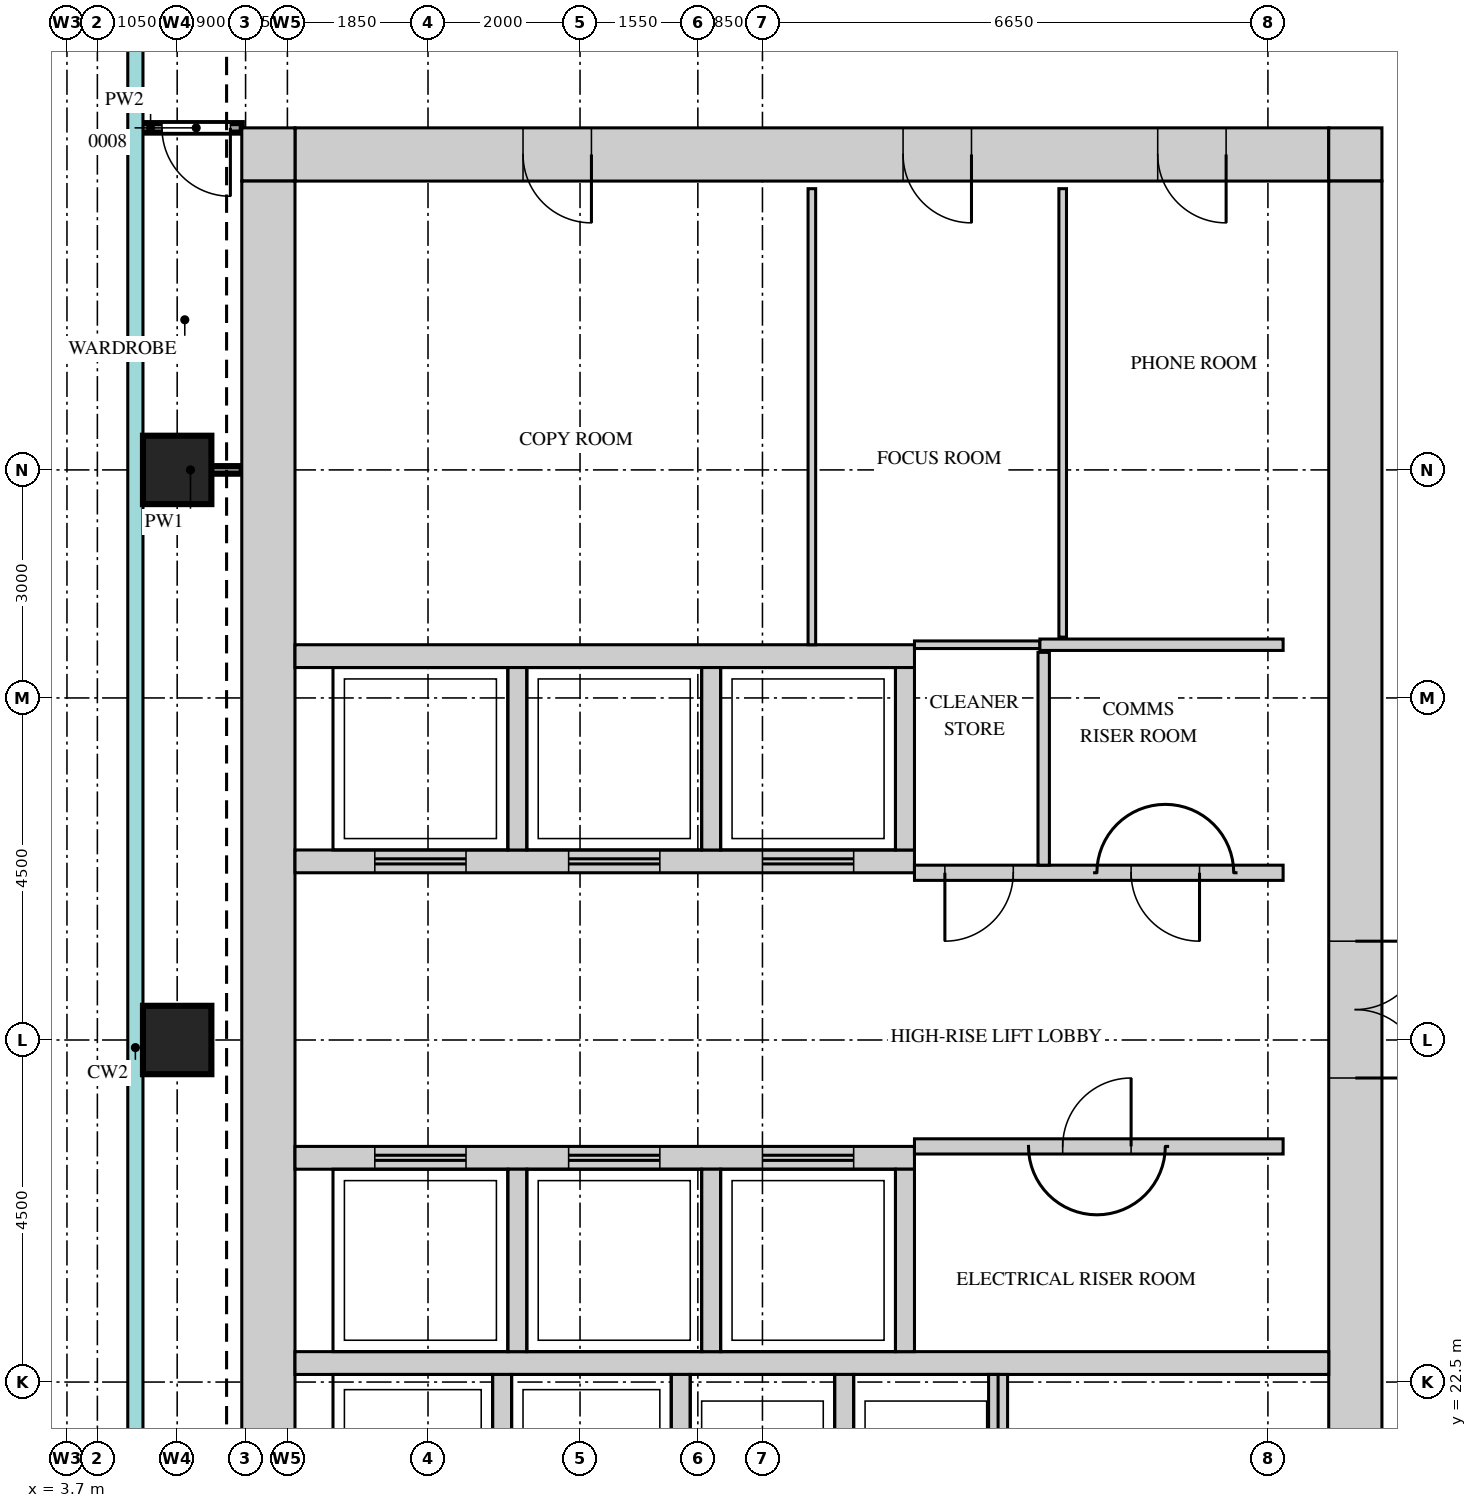
"""IFC4 building model, lengths in metres.
Left out: names, types, materials, properties, quantities, classifications, styles, units other than length and angle.
Written with IfcOpenShell. Run it as: python <this file> out.ifc"""

import sys

from ifc_helpers import new_model, si_unit, direction, frame, frame_2d, origin, origin_2d, place, context, subcontext, project, spatial, rectangle, extrude, source, transform, mapped, element, fill, save


model = new_model("IFC4")
c1 = context("Model", 3, precision=1e-05, world=origin(), true_north=direction((0.0, 1.0)))
c2 = subcontext(c1, "Body", "Model", "MODEL_VIEW")
j1 = project(units=[si_unit("LENGTHUNIT", "METRE"), si_unit("PLANEANGLEUNIT", "RADIAN")], contexts=[c1])
p1 = place(None, origin())
s1 = spatial("IfcSite", under=j1, at=p1, CompositionType="ELEMENT")
p2 = place(p1, origin())
s2 = spatial("IfcBuilding", under=s1, at=p2, CompositionType="ELEMENT")
p3 = place(p2, frame((0.0, 0.0, 270.2)))
s3 = spatial("IfcBuildingStorey", under=s2, at=p3, CompositionType="ELEMENT", Elevation=270.2)
m1 = source(origin(), c2, "Body", "SweptSolid", [
    extrude(rectangle(XDim=13.6, YDim=0.7, at=frame_2d((6.8, 0.0))), origin(), (0.0, 0.0, 1.0), 3.75),
])
p4 = place(p3, frame((6.7, 38.65, 0.0), z_axis=(0.0, 0.0, 1.0), x_axis=(1.0, 0.0, 0.0)))
e1 = element("IfcWall", 1, at=p4, inside=s3, PredefinedType="SHEAR", context=c2, shape_type="MappedRepresentation", body=[
    mapped(m1, transform((0.0, 0.0, 0.0))),
])
m2 = source(origin(), c2, "Body", "SweptSolid", [
    extrude(rectangle(XDim=0.9, YDim=2.1, at=frame_2d((0.45, 1.05))), frame((0.0, 0.36, 0.0), z_axis=(0.0, -1.0, 0.0), x_axis=(1.0, 0.0, 0.0)), (0.0, 0.0, 1.0), 0.72),
])
p5 = place(p4, frame((3.0, 0.0, 0.0)))
e2 = element("IfcOpeningElement", 2, at=p5, cuts=e1, PredefinedType="OPENING", context=c2, shape_type="MappedRepresentation", body=[
    mapped(m2, transform((0.0, 0.0, 0.0))),
])
p6 = place(p4, frame((8.0, 0.0, 0.0)))
e3 = element("IfcOpeningElement", 3, at=p6, cuts=e1, PredefinedType="OPENING", context=c2, shape_type="MappedRepresentation", body=[
    mapped(m2, transform((0.0, 0.0, 0.0))),
])
p7 = place(p4, frame((11.35, 0.0, 0.0)))
e4 = element("IfcOpeningElement", 4, at=p7, cuts=e1, PredefinedType="OPENING", context=c2, shape_type="MappedRepresentation", body=[
    mapped(m2, transform((0.0, 0.0, 0.0))),
])
m3 = source(origin(), c2, "Body", "SweptSolid", [
    extrude(rectangle(XDim=0.7, YDim=0.7, at=frame_2d((0.35, 0.0))), origin(), (0.0, 0.0, 1.0), 3.75),
])
for number, where, z_axis, x_axis in (
    (5, (20.3, 38.65, 0.0), (0.0, 0.0, 1.0), (1.0, 0.0, 0.0)),
    (6, (6.0, 38.65, 0.0), (0.0, 0.0, 1.0), (1.0, 0.0, 0.0)),
):
    element("IfcWall", number, at=place(p3, frame(where, z_axis=z_axis, x_axis=x_axis)), inside=s3, PredefinedType="SHEAR", context=c2, shape_type="MappedRepresentation", body=[
        mapped(m3, transform((0.0, 0.0, 0.0))),
    ])
m4 = source(origin(), c2, "Body", "SweptSolid", [
    extrude(rectangle(XDim=22.6, YDim=0.7, at=frame_2d((11.3, 0.0))), origin(), (0.0, 0.0, 1.0), 3.75),
])
p8 = place(p3, frame((20.65, 15.7, 0.0), z_axis=(0.0, 0.0, 1.0), x_axis=(0.0, 1.0, 0.0)))
e7 = element("IfcWall", 7, at=p8, inside=s3, PredefinedType="SHEAR", context=c2, shape_type="MappedRepresentation", body=[
    mapped(m4, transform((0.0, 0.0, 0.0))),
])
m5 = source(origin(), c2, "Body", "SweptSolid", [
    extrude(rectangle(XDim=1.8, YDim=2.1, at=frame_2d((0.9, 1.05))), frame((0.0, 0.36, 0.0), z_axis=(0.0, -1.0, 0.0), x_axis=(1.0, 0.0, 0.0)), (0.0, 0.0, 1.0), 0.72),
])
p9 = place(p8, frame((10.8, 0.0, 0.0)))
e8 = element("IfcOpeningElement", 8, at=p9, cuts=e7, PredefinedType="OPENING", context=c2, shape_type="MappedRepresentation", body=[
    mapped(m5, transform((0.0, 0.0, 0.0))),
])
p10 = place(p8, frame((0.45, 0.0, 0.0)))
e9 = element("IfcOpeningElement", 9, at=p10, cuts=e7, PredefinedType="OPENING", context=c2, shape_type="MappedRepresentation", body=[
    mapped(m2, transform((0.0, 0.0, 0.0))),
])
p11 = place(p8, frame((4.0, 0.0, 0.0)))
e10 = element("IfcOpeningElement", 10, at=p11, cuts=e7, PredefinedType="OPENING", context=c2, shape_type="MappedRepresentation", body=[
    mapped(m2, transform((0.0, 0.0, 0.0))),
])
p12 = place(p3, frame((6.35, 15.7, 0.0), z_axis=(0.0, 0.0, 1.0), x_axis=(0.0, 1.0, 0.0)))
e11 = element("IfcWall", 11, at=p12, inside=s3, PredefinedType="SHEAR", context=c2, shape_type="MappedRepresentation", body=[
    mapped(m4, transform((0.0, 0.0, 0.0))),
])
m6 = source(origin(), c2, "Body", "SweptSolid", [
    extrude(rectangle(XDim=13.6, YDim=0.3, at=frame_2d((6.8, 0.0))), origin(), (0.0, 0.0, 1.0), 3.75),
])
p13 = place(p3, frame((6.7, 22.75, 0.0), z_axis=(0.0, 0.0, 1.0), x_axis=(1.0, 0.0, 0.0)))
e12 = element("IfcWall", 12, at=p13, inside=s3, PredefinedType="STANDARD", context=c2, shape_type="MappedRepresentation", body=[
    mapped(m6, transform((0.0, 0.0, 0.0))),
])
m7 = source(origin(), c2, "Body", "SweptSolid", [
    extrude(rectangle(XDim=8.15, YDim=0.3, at=frame_2d((4.075, 0.0))), origin(), (0.0, 0.0, 1.0), 3.75),
])
p14 = place(p3, frame((6.7, 32.05, 0.0), z_axis=(0.0, 0.0, 1.0), x_axis=(1.0, 0.0, 0.0)))
e13 = element("IfcWall", 13, at=p14, inside=s3, PredefinedType="STANDARD", context=c2, shape_type="MappedRepresentation", body=[
    mapped(m7, transform((0.0, 0.0, 0.0))),
])
p15 = place(p3, frame((6.7, 29.35, 0.0), z_axis=(0.0, 0.0, 1.0), x_axis=(1.0, 0.0, 0.0)))
e14 = element("IfcWall", 14, at=p15, inside=s3, PredefinedType="STANDARD", context=c2, shape_type="MappedRepresentation", body=[
    mapped(m7, transform((0.0, 0.0, 0.0))),
])
m8 = source(origin(), c2, "Body", "SweptSolid", [
    extrude(rectangle(XDim=1.2, YDim=2.1, at=frame_2d((0.6, 1.05))), frame((0.0, 0.16, 0.0), z_axis=(0.0, -1.0, 0.0), x_axis=(1.0, 0.0, 0.0)), (0.0, 0.0, 1.0), 0.32),
])
p16 = place(p15, frame((1.05, 0.0, 0.0)))
e15 = element("IfcOpeningElement", 15, at=p16, cuts=e14, PredefinedType="OPENING", context=c2, shape_type="MappedRepresentation", body=[
    mapped(m8, transform((0.0, 0.0, 0.0))),
])
p17 = place(p15, frame((3.6, 0.0, 0.0)))
e16 = element("IfcOpeningElement", 16, at=p17, cuts=e14, PredefinedType="OPENING", context=c2, shape_type="MappedRepresentation", body=[
    mapped(m8, transform((0.0, 0.0, 0.0))),
])
p18 = place(p15, frame((6.15, 0.0, 0.0)))
e17 = element("IfcOpeningElement", 17, at=p18, cuts=e14, PredefinedType="OPENING", context=c2, shape_type="MappedRepresentation", body=[
    mapped(m8, transform((0.0, 0.0, 0.0))),
])
p19 = place(p3, frame((6.7, 25.45, 0.0), z_axis=(0.0, 0.0, 1.0), x_axis=(1.0, 0.0, 0.0)))
e18 = element("IfcWall", 18, at=p19, inside=s3, PredefinedType="STANDARD", context=c2, shape_type="MappedRepresentation", body=[
    mapped(m7, transform((0.0, 0.0, 0.0))),
])
p20 = place(p19, frame((1.05, 0.0, 0.0)))
e19 = element("IfcOpeningElement", 19, at=p20, cuts=e18, PredefinedType="OPENING", context=c2, shape_type="MappedRepresentation", body=[
    mapped(m8, transform((0.0, 0.0, 0.0))),
])
p21 = place(p19, frame((3.6, 0.0, 0.0)))
e20 = element("IfcOpeningElement", 20, at=p21, cuts=e18, PredefinedType="OPENING", context=c2, shape_type="MappedRepresentation", body=[
    mapped(m8, transform((0.0, 0.0, 0.0))),
])
p22 = place(p19, frame((6.15, 0.0, 0.0)))
e21 = element("IfcOpeningElement", 21, at=p22, cuts=e18, PredefinedType="OPENING", context=c2, shape_type="MappedRepresentation", body=[
    mapped(m8, transform((0.0, 0.0, 0.0))),
])
m9 = source(origin(), c2, "Body", "SweptSolid", [
    extrude(rectangle(XDim=3.1, YDim=0.25, at=frame_2d((1.55, 0.0))), origin(), (0.0, 0.0, 1.0), 3.75),
])
for number, where, z_axis, x_axis in (
    (22, (9.425, 19.5, 0.0), (0.0, 0.0, 1.0), (0.0, 1.0, 0.0)),
    (23, (11.775, 19.5, 0.0), (0.0, 0.0, 1.0), (0.0, 1.0, 0.0)),
    (24, (13.925, 19.5, 0.0), (0.0, 0.0, 1.0), (0.0, 1.0, 0.0)),
    (25, (15.95, 19.5, 0.0), (0.0, 0.0, 1.0), (0.0, 1.0, 0.0)),
):
    element("IfcWall", number, at=place(p3, frame(where, z_axis=z_axis, x_axis=x_axis)), inside=s3, PredefinedType="STANDARD", context=c2, shape_type="MappedRepresentation", body=[
        mapped(m9, transform((0.0, 0.0, 0.0))),
    ])
m10 = source(origin(), c2, "Body", "SweptSolid", [
    extrude(rectangle(XDim=2.4, YDim=0.25, at=frame_2d((1.2, 0.0))), origin(), (0.0, 0.0, 1.0), 3.75),
])
for number, where, z_axis, x_axis in (
    (26, (9.625, 29.5, 0.0), (0.0, 0.0, 1.0), (0.0, 1.0, 0.0)),
    (27, (12.175, 29.5, 0.0), (0.0, 0.0, 1.0), (0.0, 1.0, 0.0)),
    (28, (14.725, 29.5, 0.0), (0.0, 0.0, 1.0), (0.0, 1.0, 0.0)),
):
    element("IfcWall", number, at=place(p3, frame(where, z_axis=z_axis, x_axis=x_axis)), inside=s3, PredefinedType="STANDARD", context=c2, shape_type="MappedRepresentation", body=[
        mapped(m10, transform((0.0, 0.0, 0.0))),
    ])
m11 = source(origin(), c2, "Body", "SweptSolid", [
    extrude(rectangle(XDim=2.4, YDim=0.25, at=frame_2d((1.2, 0.0))), origin(), (0.0, 0.0, 1.0), 3.75),
])
for number, where, z_axis, x_axis in (
    (29, (9.625, 22.9, 0.0), (0.0, 0.0, 1.0), (0.0, 1.0, 0.0)),
    (30, (12.175, 22.9, 0.0), (0.0, 0.0, 1.0), (0.0, 1.0, 0.0)),
    (31, (14.725, 22.9, 0.0), (0.0, 0.0, 1.0), (0.0, 1.0, 0.0)),
):
    element("IfcWall", number, at=place(p3, frame(where, z_axis=z_axis, x_axis=x_axis)), inside=s3, PredefinedType="STANDARD", context=c2, shape_type="MappedRepresentation", body=[
        mapped(m11, transform((0.0, 0.0, 0.0))),
    ])
m12 = source(origin(), c2, "Body", "SweptSolid", [
    extrude(rectangle(XDim=0.9, YDim=0.9, at=origin_2d()), origin(), (0.0, 0.0, 1.0), 4.0),
])
for number, where, z_axis, x_axis in (
    (32, (5.15, 27.0, 0.0), (0.0, 0.0, 1.0), (1.0, 0.0, 0.0)),
    (33, (5.15, 34.5, 0.0), (0.0, 0.0, 1.0), (1.0, 0.0, 0.0)),
):
    element("IfcColumn", number, at=place(p3, frame(where, z_axis=z_axis, x_axis=x_axis)), inside=s3, PredefinedType="COLUMN", context=c2, shape_type="MappedRepresentation", body=[
        mapped(m12, transform((0.0, 0.0, 0.0))),
    ])
m13 = source(origin(), c2, "Body", "SweptSolid", [
    extrude(rectangle(XDim=4.85, YDim=0.2, at=frame_2d((2.425, 0.0))), origin(), (0.0, 0.0, 1.0), 3.8),
])
p23 = place(p3, frame((14.85, 25.6, 0.0), z_axis=(0.0, 0.0, 1.0), x_axis=(1.0, 0.0, 0.0)))
e34 = element("IfcWall", 34, at=p23, inside=s3, PredefinedType="PARTITIONING", context=c2, shape_type="MappedRepresentation", body=[
    mapped(m13, transform((0.0, 0.0, 0.0))),
])
m14 = source(origin(), c2, "Body", "SweptSolid", [
    extrude(rectangle(XDim=0.9, YDim=2.1, at=frame_2d((0.45, 1.05))), frame((0.0, 0.11, 0.0), z_axis=(0.0, -1.0, 0.0), x_axis=(1.0, 0.0, 0.0)), (0.0, 0.0, 1.0), 0.22),
])
p24 = place(p23, frame((1.95, 0.0, 0.0)))
e35 = element("IfcOpeningElement", 35, at=p24, cuts=e34, PredefinedType="OPENING", context=c2, shape_type="MappedRepresentation", body=[
    mapped(m14, transform((0.0, 0.0, 0.0))),
])
p25 = place(p3, frame((14.85, 29.2, 0.0), z_axis=(0.0, 0.0, 1.0), x_axis=(1.0, 0.0, 0.0)))
e36 = element("IfcWall", 36, at=p25, inside=s3, PredefinedType="PARTITIONING", context=c2, shape_type="MappedRepresentation", body=[
    mapped(m13, transform((0.0, 0.0, 0.0))),
])
p26 = place(p25, frame((0.4, 0.0, 0.0)))
e37 = element("IfcOpeningElement", 37, at=p26, cuts=e36, PredefinedType="OPENING", context=c2, shape_type="MappedRepresentation", body=[
    mapped(m14, transform((0.0, 0.0, 0.0))),
])
p27 = place(p25, frame((2.85, 0.0, 0.0)))
e38 = element("IfcOpeningElement", 38, at=p27, cuts=e36, PredefinedType="OPENING", context=c2, shape_type="MappedRepresentation", body=[
    mapped(m14, transform((0.0, 0.0, 0.0))),
])
m15 = source(origin(), c2, "Body", "SweptSolid", [
    extrude(rectangle(XDim=2.8, YDim=0.15, at=frame_2d((1.4, 0.0))), origin(), (0.0, 0.0, 1.0), 3.8),
])
p28 = place(p3, frame((16.55, 29.3, 0.0), z_axis=(0.0, 0.0, 1.0), x_axis=(0.0, 1.0, 0.0)))
e39 = element("IfcWall", 39, at=p28, inside=s3, PredefinedType="PARTITIONING", context=c2, shape_type="MappedRepresentation", body=[
    mapped(m15, transform((0.0, 0.0, 0.0))),
])
m16 = source(origin(), c2, "Body", "SweptSolid", [
    extrude(rectangle(XDim=6.0, YDim=0.1, at=frame_2d((3.0, 0.0))), origin(), (0.0, 0.0, 1.0), 3.8),
])
p29 = place(p3, frame((13.5, 32.2, 0.0), z_axis=(0.0, 0.0, 1.0), x_axis=(0.0, 1.0, 0.0)))
e40 = element("IfcWall", 40, at=p29, inside=s3, PredefinedType="PARTITIONING", context=c2, shape_type="MappedRepresentation", body=[
    mapped(m16, transform((0.0, 0.0, 0.0))),
])
m17 = source(origin(), c2, "Body", "SweptSolid", [
    extrude(rectangle(XDim=1.65, YDim=0.1, at=frame_2d((0.825, 0.0))), origin(), (0.0, 0.0, 1.0), 3.8),
])
p30 = place(p3, frame((14.85, 32.2, 0.0), z_axis=(0.0, 0.0, 1.0), x_axis=(1.0, 0.0, 0.0)))
e41 = element("IfcWall", 41, at=p30, inside=s3, PredefinedType="PARTITIONING", context=c2, shape_type="MappedRepresentation", body=[
    mapped(m17, transform((0.0, 0.0, 0.0))),
])
m18 = source(origin(), c2, "Body", "SweptSolid", [
    extrude(rectangle(XDim=3.2, YDim=0.15, at=frame_2d((1.6, 0.0))), origin(), (0.0, 0.0, 1.0), 3.8),
])
p31 = place(p3, frame((16.5, 32.2, 0.0), z_axis=(0.0, 0.0, 1.0), x_axis=(1.0, 0.0, 0.0)))
e42 = element("IfcWall", 42, at=p31, inside=s3, PredefinedType="PARTITIONING", context=c2, shape_type="MappedRepresentation", body=[
    mapped(m18, transform((0.0, 0.0, 0.0))),
])
m19 = source(origin(), c2, "Body", "SweptSolid", [
    extrude(rectangle(XDim=5.9, YDim=0.1, at=frame_2d((2.95, 0.0))), origin(), (0.0, 0.0, 1.0), 3.8),
])
p32 = place(p3, frame((16.8, 32.3, 0.0), z_axis=(0.0, 0.0, 1.0), x_axis=(0.0, 1.0, 0.0)))
e43 = element("IfcWall", 43, at=p32, inside=s3, PredefinedType="PARTITIONING", context=c2, shape_type="MappedRepresentation", body=[
    mapped(m19, transform((0.0, 0.0, 0.0))),
])
m20 = source(origin(), c2, "Body", "SweptSolid", [
    extrude(rectangle(XDim=1.35, YDim=0.1, at=frame_2d((0.675, 0.0))), origin(), (0.0, 0.0, 1.0), 3.8),
])
p33 = place(p3, frame((4.65, 34.5, 0.0), z_axis=(0.0, 0.0, 1.0), x_axis=(1.0, 0.0, 0.0)))
e44 = element("IfcWall", 44, at=p33, inside=s3, PredefinedType="PARTITIONING", context=c2, shape_type="MappedRepresentation", body=[
    mapped(m20, transform((0.0, 0.0, 0.0))),
])
m21 = source(origin(), c2, "Body", "SweptSolid", [
    extrude(rectangle(XDim=1.35, YDim=0.125, at=frame_2d((0.675, 0.0))), origin(), (0.0, 0.0, 1.0), 3.8),
])
p34 = place(p3, frame((4.65, 39.0, 0.0), z_axis=(0.0, 0.0, 1.0), x_axis=(1.0, 0.0, 0.0)))
e45 = element("IfcWall", 45, at=p34, inside=s3, PredefinedType="PARTITIONING", context=c2, shape_type="MappedRepresentation", body=[
    mapped(m21, transform((0.0, 0.0, 0.0))),
])
m22 = source(origin(), c2, "Body", "SweptSolid", [
    extrude(rectangle(XDim=0.9, YDim=2.1, at=frame_2d((0.45, 1.05))), frame((0.0, 0.073, 0.0), z_axis=(0.0, -1.0, 0.0), x_axis=(1.0, 0.0, 0.0)), (0.0, 0.0, 1.0), 0.145),
])
p35 = place(p34, frame((0.3, 0.0, 0.0)))
e46 = element("IfcOpeningElement", 46, at=p35, cuts=e45, PredefinedType="OPENING", context=c2, shape_type="MappedRepresentation", body=[
    mapped(m22, transform((0.0, 0.0, 0.0))),
])
m23 = source(origin(), c2, "Body", "SweptSolid", [
    extrude(rectangle(XDim=0.9, YDim=2.1, at=frame_2d((0.45, 1.05))), frame((0.0, 0.025, 0.0), z_axis=(0.0, -1.0, 0.0), x_axis=(1.0, 0.0, 0.0)), (0.0, 0.0, 1.0), 0.05),
])
p36 = place(p24, origin())
e47 = element("IfcDoor", 47, at=p36, inside=s3, OperationType="SINGLE_SWING_LEFT", PredefinedType="DOOR", context=c2, shape_type="MappedRepresentation", body=[
    mapped(m23, transform((0.0, 0.0, 0.0))),
])
fill(e35, e47)
p37 = place(p26, origin())
e48 = element("IfcDoor", 48, at=p37, inside=s3, OperationType="SINGLE_SWING_LEFT", PredefinedType="DOOR", context=c2, shape_type="MappedRepresentation", body=[
    mapped(m23, transform((0.0, 0.0, 0.0))),
])
fill(e37, e48)
p38 = place(p27, origin())
e49 = element("IfcDoor", 49, at=p38, inside=s3, OperationType="SINGLE_SWING_RIGHT", PredefinedType="DOOR", context=c2, shape_type="MappedRepresentation", body=[
    mapped(m23, transform((0.0, 0.0, 0.0))),
])
fill(e38, e49)
m24 = source(origin(), c2, "Body", "SweptSolid", [
    extrude(rectangle(XDim=1.8, YDim=2.1, at=frame_2d((0.9, 1.05))), frame((0.0, 0.3, 0.0), z_axis=(0.0, -1.0, 0.0), x_axis=(1.0, 0.0, 0.0)), (0.0, 0.0, 1.0), 0.6),
])
p39 = place(p9, origin())
e50 = element("IfcDoor", 50, at=p39, inside=s3, OperationType="DOUBLE_DOOR_SINGLE_SWING", PredefinedType="DOOR", context=c2, shape_type="MappedRepresentation", body=[
    mapped(m24, transform((0.0, 0.0, 0.0))),
])
fill(e8, e50)
m25 = source(origin(), c2, "Body", "SweptSolid", [
    extrude(rectangle(XDim=0.9, YDim=2.1, at=frame_2d((0.45, 1.05))), frame((0.0, 0.3, 0.0), z_axis=(0.0, -1.0, 0.0), x_axis=(1.0, 0.0, 0.0)), (0.0, 0.0, 1.0), 0.6),
])
p40 = place(p5, origin())
e51 = element("IfcDoor", 51, at=p40, inside=s3, OperationType="SINGLE_SWING_RIGHT", PredefinedType="DOOR", context=c2, shape_type="MappedRepresentation", body=[
    mapped(m25, transform((0.0, 0.0, 0.0))),
])
fill(e2, e51)
p41 = place(p6, origin())
e52 = element("IfcDoor", 52, at=p41, inside=s3, OperationType="SINGLE_SWING_RIGHT", PredefinedType="DOOR", context=c2, shape_type="MappedRepresentation", body=[
    mapped(m25, transform((0.0, 0.0, 0.0))),
])
fill(e3, e52)
p42 = place(p7, origin())
e53 = element("IfcDoor", 53, at=p42, inside=s3, OperationType="SINGLE_SWING_RIGHT", PredefinedType="DOOR", context=c2, shape_type="MappedRepresentation", body=[
    mapped(m25, transform((0.0, 0.0, 0.0))),
])
fill(e4, e53)
p43 = place(p35, origin())
e54 = element("IfcDoor", 54, at=p43, inside=s3, OperationType="SINGLE_SWING_RIGHT", PredefinedType="DOOR", context=c2, shape_type="MappedRepresentation", body=[
    mapped(m23, transform((0.0, 0.0, 0.0))),
])
fill(e46, e54)
m26 = source(origin(), c2, "Body", "SweptSolid", [
    extrude(rectangle(XDim=1.2, YDim=2.1, at=frame_2d((0.6, 1.05))), frame((0.0, 0.025, 0.0), z_axis=(0.0, -1.0, 0.0), x_axis=(1.0, 0.0, 0.0)), (0.0, 0.0, 1.0), 0.05),
])
p44 = place(p20, origin())
e55 = element("IfcDoor", 55, at=p44, inside=s3, OperationType="DOUBLE_DOOR_SLIDING", PredefinedType="DOOR", context=c2, shape_type="MappedRepresentation", body=[
    mapped(m26, transform((0.0, 0.0, 0.0))),
])
fill(e19, e55)
p45 = place(p21, origin())
e56 = element("IfcDoor", 56, at=p45, inside=s3, OperationType="DOUBLE_DOOR_SLIDING", PredefinedType="DOOR", context=c2, shape_type="MappedRepresentation", body=[
    mapped(m26, transform((0.0, 0.0, 0.0))),
])
fill(e20, e56)
p46 = place(p22, origin())
e57 = element("IfcDoor", 57, at=p46, inside=s3, OperationType="DOUBLE_DOOR_SLIDING", PredefinedType="DOOR", context=c2, shape_type="MappedRepresentation", body=[
    mapped(m26, transform((0.0, 0.0, 0.0))),
])
fill(e21, e57)
p47 = place(p16, origin())
e58 = element("IfcDoor", 58, at=p47, inside=s3, OperationType="DOUBLE_DOOR_SLIDING", PredefinedType="DOOR", context=c2, shape_type="MappedRepresentation", body=[
    mapped(m26, transform((0.0, 0.0, 0.0))),
])
fill(e15, e58)
p48 = place(p17, origin())
e59 = element("IfcDoor", 59, at=p48, inside=s3, OperationType="DOUBLE_DOOR_SLIDING", PredefinedType="DOOR", context=c2, shape_type="MappedRepresentation", body=[
    mapped(m26, transform((0.0, 0.0, 0.0))),
])
fill(e16, e59)
p49 = place(p18, origin())
e60 = element("IfcDoor", 60, at=p49, inside=s3, OperationType="DOUBLE_DOOR_SLIDING", PredefinedType="DOOR", context=c2, shape_type="MappedRepresentation", body=[
    mapped(m26, transform((0.0, 0.0, 0.0))),
])
fill(e17, e60)
save(model, sys.argv[1])
